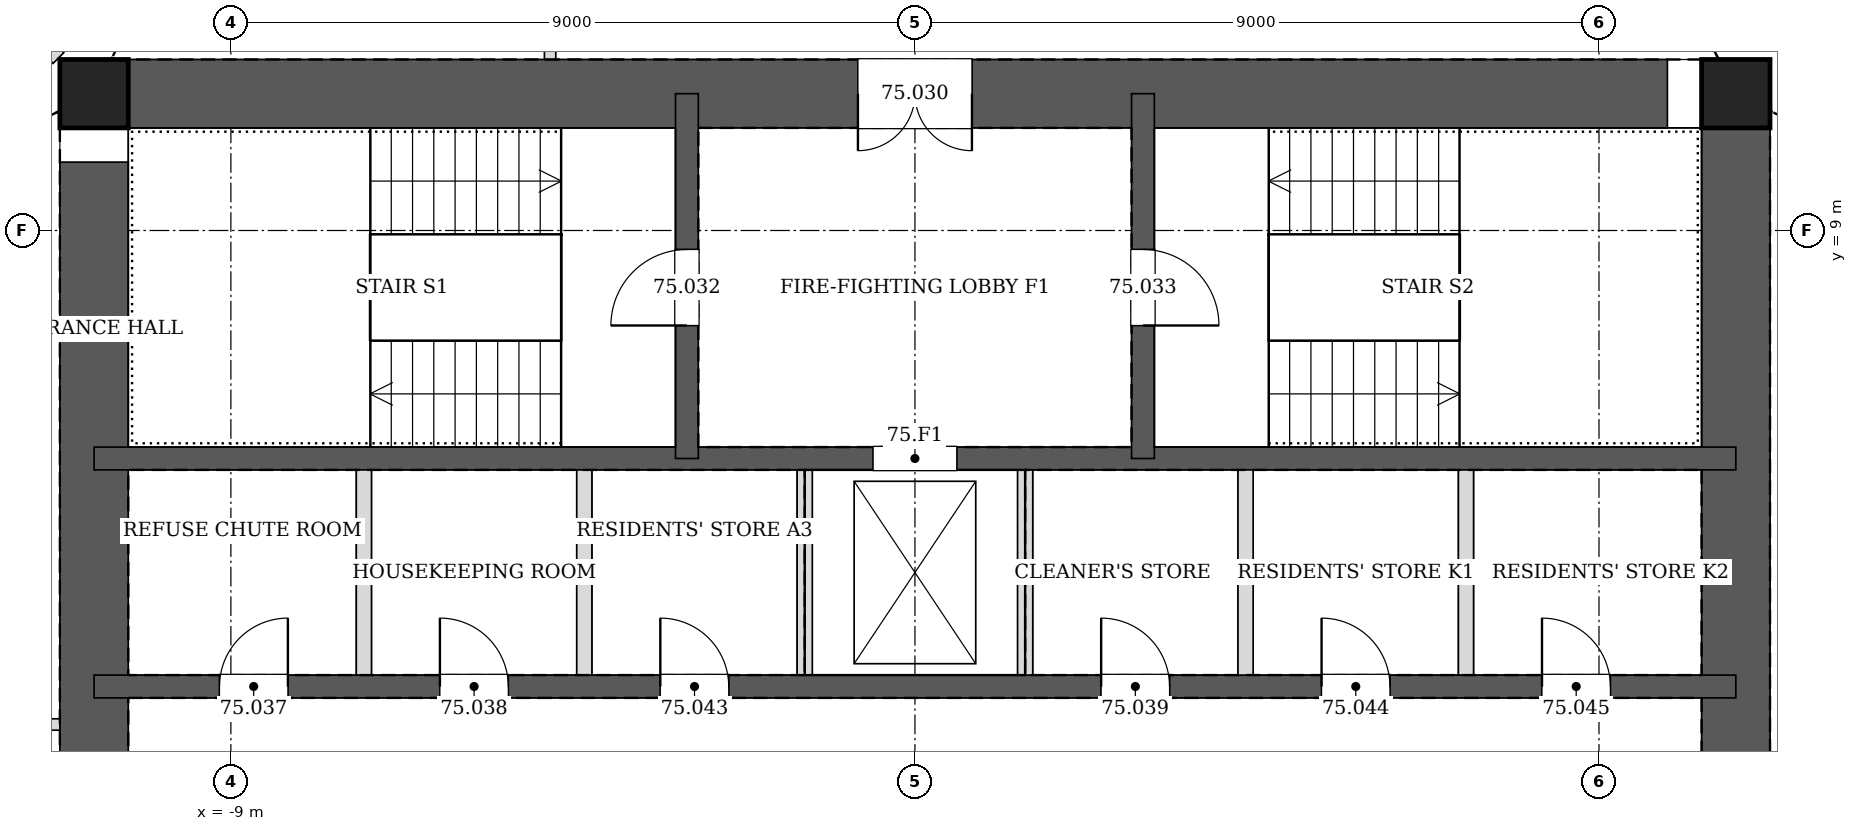
"""IFC4 building model, lengths in metres.
Left out: names, types, materials, properties, quantities, classifications, styles, units other than length and angle.
Written with IfcOpenShell. Run it as: python <this file> out.ifc"""

import sys

from ifc_helpers import new_model, si_unit, direction, frame, frame_2d, origin, origin_2d, place, context, subcontext, project, spatial, rectangle, hollow_rectangle, extrude, element, fill, save


model = new_model("IFC4")
c1 = context("Model", 3, precision=1e-05, world=origin(), true_north=direction((0.0, 1.0)))
c2 = subcontext(c1, "Body", "Model", "MODEL_VIEW")
j1 = project(units=[si_unit("LENGTHUNIT", "METRE"), si_unit("PLANEANGLEUNIT", "RADIAN")], contexts=[c1])
p1 = place(None, origin())
s1 = spatial("IfcSite", under=j1, at=p1, CompositionType="ELEMENT")
p2 = place(p1, origin())
s2 = spatial("IfcBuilding", under=s1, at=p2, CompositionType="ELEMENT")
p3 = place(p2, frame((0.0, 0.0, 304.8)))
s3 = spatial("IfcBuildingStorey", under=s2, at=p3, CompositionType="ELEMENT", Elevation=304.8)
for number, where, z_axis, x_axis in (
    (1, (10.8, 10.8, 0.0), (0.0, 0.0, 1.0), (1.0, 0.0, 0.0)),
    (2, (-10.8, 10.8, 0.0), (0.0, 0.0, 1.0), (1.0, 0.0, 0.0)),
):
    element("IfcColumn", number, at=place(p3, frame(where, z_axis=z_axis, x_axis=x_axis)), inside=s3, PredefinedType="COLUMN", context=c2, shape_type="SweptSolid", body=[
        extrude(hollow_rectangle(XDim=0.9, YDim=0.9, WallThickness=0.04, at=origin_2d()), origin(), (0.0, 0.0, 1.0), 3.4),
    ])
p4 = place(p3, frame((10.8, -10.8, 0.0), z_axis=(0.0, 0.0, 1.0), x_axis=(0.0, 1.0, 0.0)))
e3 = element("IfcWall", 3, at=p4, inside=s3, PredefinedType="SOLIDWALL", context=c2, shape_type="SweptSolid", body=[
    extrude(rectangle(XDim=21.6, YDim=0.9, at=frame_2d((10.8, 0.0))), origin(), (0.0, 0.0, 1.0), 3.4),
])
p5 = place(p4, frame((11.7, 0.0, 0.0)))
e4 = element("IfcOpeningElement", 4, at=p5, cuts=e3, PredefinedType="OPENING", context=c2, shape_type="SweptSolid", body=[
    extrude(rectangle(XDim=1.2, YDim=2.1, at=frame_2d((0.6, 1.05))), frame((0.0, 0.46, 0.0), z_axis=(0.0, -1.0, 0.0), x_axis=(1.0, 0.0, 0.0)), (0.0, 0.0, 1.0), 0.92),
])
p6 = place(p4, frame((8.7, 0.0, 0.0)))
e5 = element("IfcOpeningElement", 5, at=p6, cuts=e3, PredefinedType="OPENING", context=c2, shape_type="SweptSolid", body=[
    extrude(rectangle(XDim=1.2, YDim=2.1, at=frame_2d((0.6, 1.05))), frame((0.0, 0.46, 0.0), z_axis=(0.0, -1.0, 0.0), x_axis=(1.0, 0.0, 0.0)), (0.0, 0.0, 1.0), 0.92),
])
p7 = place(p3, frame((10.8, 10.8, 0.0), z_axis=(0.0, 0.0, 1.0), x_axis=(-1.0, 0.0, 0.0)))
e6 = element("IfcWall", 6, at=p7, inside=s3, PredefinedType="SOLIDWALL", context=c2, shape_type="SweptSolid", body=[
    extrude(rectangle(XDim=21.6, YDim=0.9, at=frame_2d((10.8, 0.0))), origin(), (0.0, 0.0, 1.0), 3.4),
])
p8 = place(p7, frame((10.05, 0.0, 0.0)))
e7 = element("IfcOpeningElement", 7, at=p8, cuts=e6, PredefinedType="OPENING", context=c2, shape_type="SweptSolid", body=[
    extrude(rectangle(XDim=1.5, YDim=2.1, at=frame_2d((0.75, 1.05))), frame((0.0, 0.46, 0.0), z_axis=(0.0, -1.0, 0.0), x_axis=(1.0, 0.0, 0.0)), (0.0, 0.0, 1.0), 0.92),
])
p9 = place(p3, frame((-10.8, 10.8, 0.0), z_axis=(0.0, 0.0, 1.0), x_axis=(0.0, -1.0, 0.0)))
e8 = element("IfcWall", 8, at=p9, inside=s3, PredefinedType="SOLIDWALL", context=c2, shape_type="SweptSolid", body=[
    extrude(rectangle(XDim=21.6, YDim=0.9, at=frame_2d((10.8, 0.0))), origin(), (0.0, 0.0, 1.0), 3.4),
])
p10 = place(p9, frame((8.7, 0.0, 0.0)))
e9 = element("IfcOpeningElement", 9, at=p10, cuts=e8, PredefinedType="OPENING", context=c2, shape_type="SweptSolid", body=[
    extrude(rectangle(XDim=1.2, YDim=2.1, at=frame_2d((0.6, 1.05))), frame((0.0, 0.46, 0.0), z_axis=(0.0, -1.0, 0.0), x_axis=(1.0, 0.0, 0.0)), (0.0, 0.0, 1.0), 0.92),
])
p11 = place(p9, frame((11.7, 0.0, 0.0)))
e10 = element("IfcOpeningElement", 10, at=p11, cuts=e8, PredefinedType="OPENING", context=c2, shape_type="SweptSolid", body=[
    extrude(rectangle(XDim=1.2, YDim=2.1, at=frame_2d((0.6, 1.05))), frame((0.0, 0.46, 0.0), z_axis=(0.0, -1.0, 0.0), x_axis=(1.0, 0.0, 0.0)), (0.0, 0.0, 1.0), 0.92),
])
p12 = place(p3, frame((-10.8, 3.0, 0.0), z_axis=(0.0, 0.0, 1.0), x_axis=(1.0, 0.0, 0.0)))
e11 = element("IfcWall", 11, at=p12, inside=s3, PredefinedType="SOLIDWALL", context=c2, shape_type="SweptSolid", body=[
    extrude(rectangle(XDim=21.6, YDim=0.3, at=frame_2d((10.8, 0.0))), origin(), (0.0, 0.0, 1.0), 3.4),
])
p13 = place(p12, frame((1.65, 0.0, 0.0)))
e12 = element("IfcOpeningElement", 12, at=p13, cuts=e11, PredefinedType="OPENING", context=c2, shape_type="SweptSolid", body=[
    extrude(rectangle(XDim=0.9, YDim=2.1, at=frame_2d((0.45, 1.05))), frame((0.0, 0.16, 0.0), z_axis=(0.0, -1.0, 0.0), x_axis=(1.0, 0.0, 0.0)), (0.0, 0.0, 1.0), 0.32),
])
p14 = place(p12, frame((4.55, 0.0, 0.0)))
e13 = element("IfcOpeningElement", 13, at=p14, cuts=e11, PredefinedType="OPENING", context=c2, shape_type="SweptSolid", body=[
    extrude(rectangle(XDim=0.9, YDim=2.1, at=frame_2d((0.45, 1.05))), frame((0.0, 0.16, 0.0), z_axis=(0.0, -1.0, 0.0), x_axis=(1.0, 0.0, 0.0)), (0.0, 0.0, 1.0), 0.32),
])
p15 = place(p12, frame((13.25, 0.0, 0.0)))
e14 = element("IfcOpeningElement", 14, at=p15, cuts=e11, PredefinedType="OPENING", context=c2, shape_type="SweptSolid", body=[
    extrude(rectangle(XDim=0.9, YDim=2.1, at=frame_2d((0.45, 1.05))), frame((0.0, 0.16, 0.0), z_axis=(0.0, -1.0, 0.0), x_axis=(1.0, 0.0, 0.0)), (0.0, 0.0, 1.0), 0.32),
])
p16 = place(p12, frame((7.45, 0.0, 0.0)))
e15 = element("IfcOpeningElement", 15, at=p16, cuts=e11, PredefinedType="OPENING", context=c2, shape_type="SweptSolid", body=[
    extrude(rectangle(XDim=0.9, YDim=2.1, at=frame_2d((0.45, 1.05))), frame((0.0, 0.16, 0.0), z_axis=(0.0, -1.0, 0.0), x_axis=(1.0, 0.0, 0.0)), (0.0, 0.0, 1.0), 0.32),
])
p17 = place(p12, frame((16.15, 0.0, 0.0)))
e16 = element("IfcOpeningElement", 16, at=p17, cuts=e11, PredefinedType="OPENING", context=c2, shape_type="SweptSolid", body=[
    extrude(rectangle(XDim=0.9, YDim=2.1, at=frame_2d((0.45, 1.05))), frame((0.0, 0.16, 0.0), z_axis=(0.0, -1.0, 0.0), x_axis=(1.0, 0.0, 0.0)), (0.0, 0.0, 1.0), 0.32),
])
p18 = place(p12, frame((19.05, 0.0, 0.0)))
e17 = element("IfcOpeningElement", 17, at=p18, cuts=e11, PredefinedType="OPENING", context=c2, shape_type="SweptSolid", body=[
    extrude(rectangle(XDim=0.9, YDim=2.1, at=frame_2d((0.45, 1.05))), frame((0.0, 0.16, 0.0), z_axis=(0.0, -1.0, 0.0), x_axis=(1.0, 0.0, 0.0)), (0.0, 0.0, 1.0), 0.32),
])
p19 = place(p3, frame((-10.8, 6.0, 0.0), z_axis=(0.0, 0.0, 1.0), x_axis=(1.0, 0.0, 0.0)))
e18 = element("IfcWall", 18, at=p19, inside=s3, PredefinedType="SOLIDWALL", context=c2, shape_type="SweptSolid", body=[
    extrude(rectangle(XDim=21.6, YDim=0.3, at=frame_2d((10.8, 0.0))), origin(), (0.0, 0.0, 1.0), 3.4),
])
p20 = place(p19, frame((10.25, 0.0, 0.0)))
e19 = element("IfcOpeningElement", 19, at=p20, cuts=e18, PredefinedType="OPENING", context=c2, shape_type="SweptSolid", body=[
    extrude(rectangle(XDim=1.1, YDim=2.1, at=frame_2d((0.55, 1.05))), frame((0.0, 0.16, 0.0), z_axis=(0.0, -1.0, 0.0), x_axis=(1.0, 0.0, 0.0)), (0.0, 0.0, 1.0), 0.32),
])
p21 = place(p3, frame((-3.0, 6.0, 0.0), z_axis=(0.0, 0.0, 1.0), x_axis=(0.0, 1.0, 0.0)))
e20 = element("IfcWall", 20, at=p21, inside=s3, PredefinedType="SOLIDWALL", context=c2, shape_type="SweptSolid", body=[
    extrude(rectangle(XDim=4.8, YDim=0.3, at=frame_2d((2.4, 0.0))), origin(), (0.0, 0.0, 1.0), 3.4),
])
p22 = place(p21, frame((1.75, 0.0, 0.0)))
e21 = element("IfcOpeningElement", 21, at=p22, cuts=e20, PredefinedType="OPENING", context=c2, shape_type="SweptSolid", body=[
    extrude(rectangle(XDim=1.0, YDim=2.1, at=frame_2d((0.5, 1.05))), frame((0.0, 0.16, 0.0), z_axis=(0.0, -1.0, 0.0), x_axis=(1.0, 0.0, 0.0)), (0.0, 0.0, 1.0), 0.32),
])
p23 = place(p3, frame((3.0, 6.0, 0.0), z_axis=(0.0, 0.0, 1.0), x_axis=(0.0, 1.0, 0.0)))
e22 = element("IfcWall", 22, at=p23, inside=s3, PredefinedType="SOLIDWALL", context=c2, shape_type="SweptSolid", body=[
    extrude(rectangle(XDim=4.8, YDim=0.3, at=frame_2d((2.4, 0.0))), origin(), (0.0, 0.0, 1.0), 3.4),
])
p24 = place(p23, frame((1.75, 0.0, 0.0)))
e23 = element("IfcOpeningElement", 23, at=p24, cuts=e22, PredefinedType="OPENING", context=c2, shape_type="SweptSolid", body=[
    extrude(rectangle(XDim=1.0, YDim=2.1, at=frame_2d((0.5, 1.05))), frame((0.0, 0.16, 0.0), z_axis=(0.0, -1.0, 0.0), x_axis=(1.0, 0.0, 0.0)), (0.0, 0.0, 1.0), 0.32),
])
p25 = place(p3, frame((-4.8, 12.9, 0.0), z_axis=(0.0, 0.0, 1.0), x_axis=(0.0, -1.0, 0.0)))
e24 = element("IfcWall", 24, at=p25, inside=s3, PredefinedType="PARTITIONING", context=c2, shape_type="SweptSolid", body=[
    extrude(rectangle(XDim=1.65, YDim=0.15, at=frame_2d((0.825, 0.0))), origin(), (0.0, 0.0, 1.0), 3.2),
])
p26 = place(p3, frame((-11.25, 2.5, 0.0), z_axis=(0.0, 0.0, 1.0), x_axis=(-1.0, 0.0, 0.0)))
e25 = element("IfcWall", 25, at=p26, inside=s3, PredefinedType="PARTITIONING", context=c2, shape_type="SweptSolid", body=[
    extrude(rectangle(XDim=1.65, YDim=0.15, at=frame_2d((0.825, 0.0))), origin(), (0.0, 0.0, 1.0), 3.2),
])
p27 = place(p26, frame((0.35, 0.0, 0.0)))
e26 = element("IfcOpeningElement", 26, at=p27, cuts=e25, PredefinedType="OPENING", context=c2, shape_type="SweptSolid", body=[
    extrude(rectangle(XDim=0.95, YDim=2.1, at=frame_2d((0.475, 1.05))), frame((0.0, 0.085, 0.0), z_axis=(0.0, -1.0, 0.0), x_axis=(1.0, 0.0, 0.0)), (0.0, 0.0, 1.0), 0.17),
])
p28 = place(p3, frame((-12.901, 12.901, 0.0), z_axis=(0.0, 0.0, 1.0), x_axis=(0.707106781187, -0.707106781187, 0.0)))
e27 = element("IfcWall", 27, at=p28, inside=s3, PredefinedType="PARTITIONING", context=c2, shape_type="SweptSolid", body=[
    extrude(rectangle(XDim=2.308, YDim=0.2, at=frame_2d((1.154, 0.0))), origin(), (0.0, 0.0, 1.0), 2.591),
])
for number, where, z_axis, x_axis in (
    (28, (-7.25, 3.15, 0.0), (0.0, 0.0, 1.0), (0.0, 1.0, 0.0)),
    (29, (-4.35, 3.15, 0.0), (0.0, 0.0, 1.0), (0.0, 1.0, 0.0)),
    (30, (-1.45, 3.15, 0.0), (0.0, 0.0, 1.0), (0.0, 1.0, 0.0)),
    (31, (1.45, 3.15, 0.0), (0.0, 0.0, 1.0), (0.0, 1.0, 0.0)),
    (32, (4.35, 3.15, 0.0), (0.0, 0.0, 1.0), (0.0, 1.0, 0.0)),
    (33, (7.25, 3.15, 0.0), (0.0, 0.0, 1.0), (0.0, 1.0, 0.0)),
):
    element("IfcWall", number, at=place(p3, frame(where, z_axis=z_axis, x_axis=x_axis)), inside=s3, PredefinedType="PARTITIONING", context=c2, shape_type="SweptSolid", body=[
        extrude(rectangle(XDim=2.7, YDim=0.2, at=frame_2d((1.35, 0.0))), origin(), (0.0, 0.0, 1.0), 3.2),
    ])
p29 = place(p8, origin())
e34 = element("IfcDoor", 34, at=p29, inside=s3, OperationType="DOUBLE_DOOR_SINGLE_SWING", PredefinedType="DOOR", context=c2, shape_type="SweptSolid", body=[
    extrude(rectangle(XDim=1.5, YDim=2.1, at=frame_2d((0.75, 1.05))), frame((0.0, 0.025, 0.0), z_axis=(0.0, -1.0, 0.0), x_axis=(1.0, 0.0, 0.0)), (0.0, 0.0, 1.0), 0.05),
])
fill(e7, e34)
p30 = place(p22, origin())
e35 = element("IfcDoor", 35, at=p30, inside=s3, OperationType="SINGLE_SWING_LEFT", PredefinedType="DOOR", context=c2, shape_type="SweptSolid", body=[
    extrude(rectangle(XDim=1.0, YDim=2.1, at=frame_2d((0.5, 1.05))), frame((0.0, 0.025, 0.0), z_axis=(0.0, -1.0, 0.0), x_axis=(1.0, 0.0, 0.0)), (0.0, 0.0, 1.0), 0.05),
])
fill(e21, e35)
p31 = place(p24, frame((1.0, 0.0, 0.0), z_axis=(0.0, 0.0, 1.0), x_axis=(-1.0, 0.0, 0.0)))
e36 = element("IfcDoor", 36, at=p31, inside=s3, OperationType="SINGLE_SWING_RIGHT", PredefinedType="DOOR", context=c2, shape_type="SweptSolid", body=[
    extrude(rectangle(XDim=1.0, YDim=2.1, at=frame_2d((0.5, 1.05))), frame((0.0, 0.025, 0.0), z_axis=(0.0, -1.0, 0.0), x_axis=(1.0, 0.0, 0.0)), (0.0, 0.0, 1.0), 0.05),
])
fill(e23, e36)
p32 = place(p13, origin())
e37 = element("IfcDoor", 37, at=p32, inside=s3, OperationType="SINGLE_SWING_RIGHT", PredefinedType="DOOR", context=c2, shape_type="SweptSolid", body=[
    extrude(rectangle(XDim=0.9, YDim=2.1, at=frame_2d((0.45, 1.05))), frame((0.0, 0.025, 0.0), z_axis=(0.0, -1.0, 0.0), x_axis=(1.0, 0.0, 0.0)), (0.0, 0.0, 1.0), 0.05),
])
fill(e12, e37)
p33 = place(p14, origin())
e38 = element("IfcDoor", 38, at=p33, inside=s3, OperationType="SINGLE_SWING_LEFT", PredefinedType="DOOR", context=c2, shape_type="SweptSolid", body=[
    extrude(rectangle(XDim=0.9, YDim=2.1, at=frame_2d((0.45, 1.05))), frame((0.0, 0.025, 0.0), z_axis=(0.0, -1.0, 0.0), x_axis=(1.0, 0.0, 0.0)), (0.0, 0.0, 1.0), 0.05),
])
fill(e13, e38)
p34 = place(p15, origin())
e39 = element("IfcDoor", 39, at=p34, inside=s3, OperationType="SINGLE_SWING_LEFT", PredefinedType="DOOR", context=c2, shape_type="SweptSolid", body=[
    extrude(rectangle(XDim=0.9, YDim=2.1, at=frame_2d((0.45, 1.05))), frame((0.0, 0.025, 0.0), z_axis=(0.0, -1.0, 0.0), x_axis=(1.0, 0.0, 0.0)), (0.0, 0.0, 1.0), 0.05),
])
fill(e14, e39)
p35 = place(p16, origin())
e40 = element("IfcDoor", 40, at=p35, inside=s3, OperationType="SINGLE_SWING_LEFT", PredefinedType="DOOR", context=c2, shape_type="SweptSolid", body=[
    extrude(rectangle(XDim=0.9, YDim=2.1, at=frame_2d((0.45, 1.05))), frame((0.0, 0.025, 0.0), z_axis=(0.0, -1.0, 0.0), x_axis=(1.0, 0.0, 0.0)), (0.0, 0.0, 1.0), 0.05),
])
fill(e15, e40)
p36 = place(p17, origin())
e41 = element("IfcDoor", 41, at=p36, inside=s3, OperationType="SINGLE_SWING_LEFT", PredefinedType="DOOR", context=c2, shape_type="SweptSolid", body=[
    extrude(rectangle(XDim=0.9, YDim=2.1, at=frame_2d((0.45, 1.05))), frame((0.0, 0.025, 0.0), z_axis=(0.0, -1.0, 0.0), x_axis=(1.0, 0.0, 0.0)), (0.0, 0.0, 1.0), 0.05),
])
fill(e16, e41)
p37 = place(p18, origin())
e42 = element("IfcDoor", 42, at=p37, inside=s3, OperationType="SINGLE_SWING_LEFT", PredefinedType="DOOR", context=c2, shape_type="SweptSolid", body=[
    extrude(rectangle(XDim=0.9, YDim=2.1, at=frame_2d((0.45, 1.05))), frame((0.0, 0.025, 0.0), z_axis=(0.0, -1.0, 0.0), x_axis=(1.0, 0.0, 0.0)), (0.0, 0.0, 1.0), 0.05),
])
fill(e17, e42)
p38 = place(p20, origin())
e43 = element("IfcDoor", 43, at=p38, inside=s3, OperationType="DOUBLE_DOOR_SLIDING", PredefinedType="DOOR", context=c2, shape_type="SweptSolid", body=[
    extrude(rectangle(XDim=1.1, YDim=2.1, at=frame_2d((0.55, 1.05))), frame((0.0, 0.025, 0.0), z_axis=(0.0, -1.0, 0.0), x_axis=(1.0, 0.0, 0.0)), (0.0, 0.0, 1.0), 0.05),
])
fill(e19, e43)
save(model, sys.argv[1])
